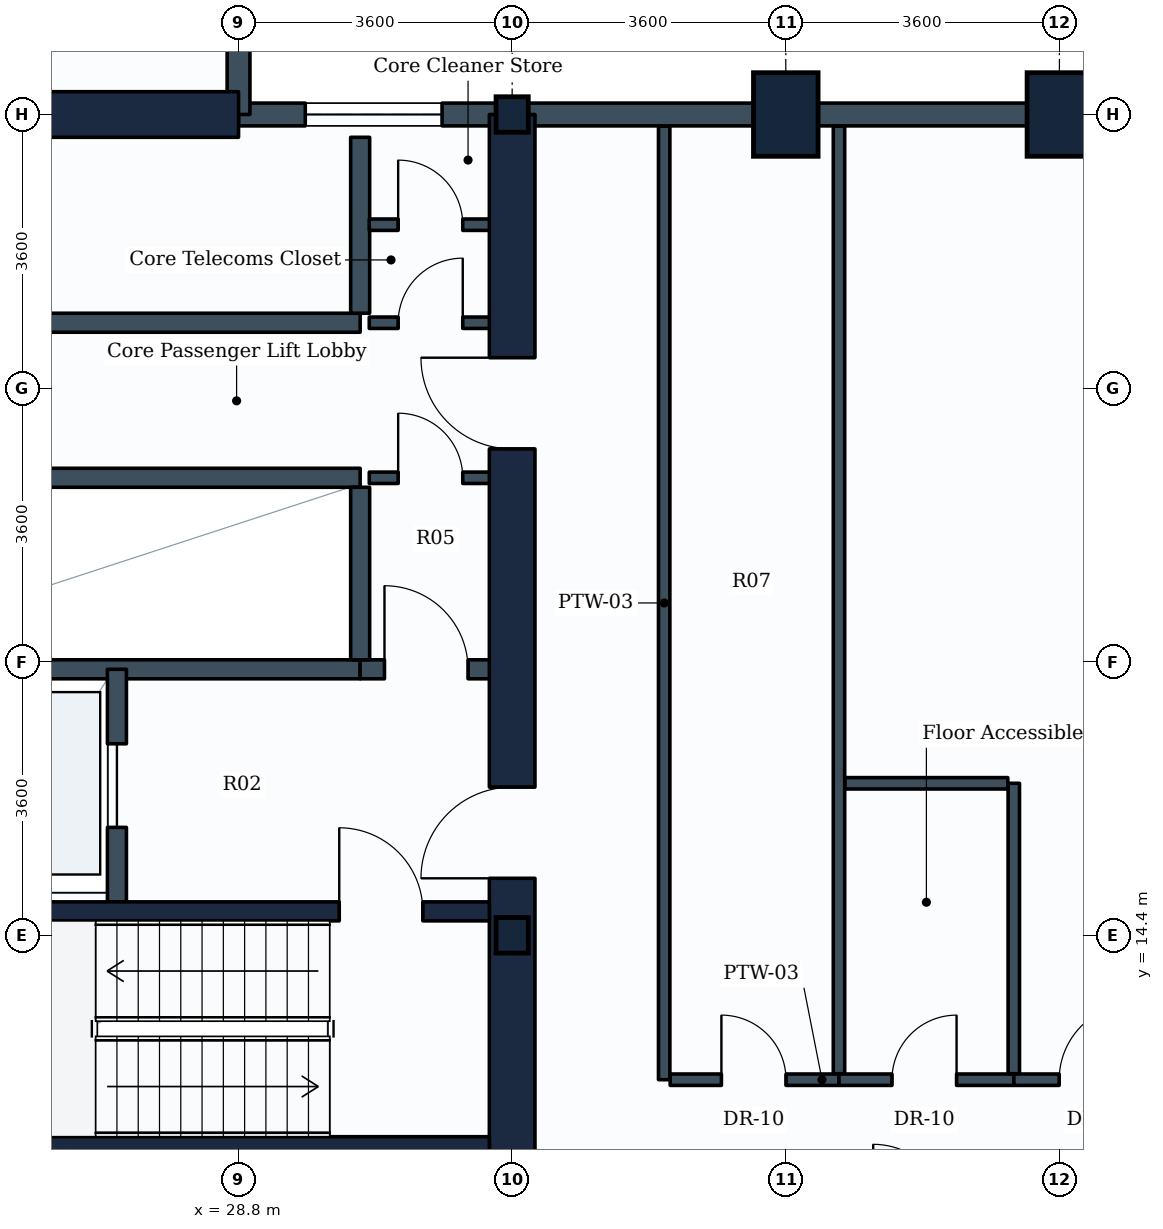
"""IFC4 building model, lengths in metres.
Left out: names, types, materials, properties, quantities, classifications, styles, units other than length and angle.
Written with IfcOpenShell. Run it as: python <this file> out.ifc"""

import sys

from ifc_helpers import new_model, si_unit, direction, frame, frame_2d, origin, origin_2d, place, context, subcontext, project, spatial, rectangle, i_section, extrude, element, fill, save


model = new_model("IFC4")
c1 = context("Model", 3, precision=1e-05, world=origin(), true_north=direction((0.0, 1.0)))
c2 = subcontext(c1, "Body", "Model", "MODEL_VIEW")
j1 = project(units=[si_unit("LENGTHUNIT", "METRE"), si_unit("PLANEANGLEUNIT", "RADIAN")], contexts=[c1])
p1 = place(None, origin())
s1 = spatial("IfcSite", under=j1, at=p1, CompositionType="ELEMENT")
p2 = place(p1, origin())
s2 = spatial("IfcBuilding", under=s1, at=p2, CompositionType="ELEMENT")
p3 = place(p2, frame((0.0, 0.0, 87.9)))
s3 = spatial("IfcBuildingStorey", under=s2, at=p3, CompositionType="ELEMENT", Elevation=87.9)
for number, where, z_axis, x_axis in (
    (1, (32.4, 14.4, 0.0), (0.0, 0.0, 1.0), (1.0, 0.0, 0.0)),
    (2, (32.4, 25.2, 0.0), (0.0, 0.0, 1.0), (1.0, 0.0, 0.0)),
):
    element("IfcColumn", number, at=place(p3, frame(where, z_axis=z_axis, x_axis=x_axis)), inside=s3, PredefinedType="COLUMN", context=c2, shape_type="SweptSolid", body=[
        extrude(i_section(OverallWidth=0.424, OverallDepth=0.467, WebThickness=0.033, FlangeThickness=0.053, FilletRadius=0.015, at=origin_2d()), origin(), (0.0, 0.0, 1.0), 3.9),
    ])
for number, where, z_axis, x_axis in (
    (3, (36.0, 25.2, 0.0), (0.0, 0.0, 1.0), (1.0, 0.0, 0.0)),
    (4, (39.6, 25.2, 0.0), (0.0, 0.0, 1.0), (1.0, 0.0, 0.0)),
):
    element("IfcColumn", number, at=place(p3, frame(where, z_axis=z_axis, x_axis=x_axis)), inside=s3, PredefinedType="COLUMN", context=c2, shape_type="SweptSolid", body=[
        extrude(rectangle(XDim=0.85, YDim=1.1, at=origin_2d()), origin(), (0.0, 0.0, 1.0), 3.9),
    ])
p4 = place(p3, frame((39.6, 25.2, 0.0), z_axis=(0.0, 0.0, 1.0), x_axis=(1.0, 0.0, 0.0)))
e5 = element("IfcWall", 5, at=p4, inside=s3, PredefinedType="STANDARD", context=c2, shape_type="SweptSolid", body=[
    extrude(rectangle(XDim=3.6, YDim=0.3, at=frame_2d((1.8, 0.0))), origin(), (0.0, 0.0, 1.0), 2.93),
])
p5 = place(p4, frame((0.9, 0.0, 0.85)))
e6 = element("IfcOpeningElement", 6, at=p5, cuts=e5, PredefinedType="OPENING", context=c2, shape_type="SweptSolid", body=[
    extrude(rectangle(XDim=1.8, YDim=1.35, at=frame_2d((0.9, 0.675))), frame((0.0, 0.16, 0.0), z_axis=(0.0, -1.0, 0.0), x_axis=(1.0, 0.0, 0.0)), (0.0, 0.0, 1.0), 0.32),
])
for number, where, z_axis, x_axis in (
    (7, (36.0, 25.2, 0.0), (0.0, 0.0, 1.0), (1.0, 0.0, 0.0)),
    (8, (32.4, 25.2, 0.0), (0.0, 0.0, 1.0), (1.0, 0.0, 0.0)),
):
    element("IfcWall", number, at=place(p3, frame(where, z_axis=z_axis, x_axis=x_axis)), inside=s3, PredefinedType="STANDARD", context=c2, shape_type="SweptSolid", body=[
        extrude(rectangle(XDim=3.6, YDim=0.3, at=frame_2d((1.8, 0.0))), origin(), (0.0, 0.0, 1.0), 2.93),
    ])
p6 = place(p3, frame((28.8, 25.2, 0.0), z_axis=(0.0, 0.0, 1.0), x_axis=(1.0, 0.0, 0.0)))
e9 = element("IfcWall", 9, at=p6, inside=s3, PredefinedType="STANDARD", context=c2, shape_type="SweptSolid", body=[
    extrude(rectangle(XDim=3.6, YDim=0.3, at=frame_2d((1.8, 0.0))), origin(), (0.0, 0.0, 1.0), 3.635),
])
p7 = place(p6, frame((0.878, 0.0, 0.85)))
e10 = element("IfcOpeningElement", 10, at=p7, cuts=e9, PredefinedType="OPENING", context=c2, shape_type="SweptSolid", body=[
    extrude(rectangle(XDim=1.8, YDim=1.35, at=frame_2d((0.9, 0.675))), frame((0.0, 0.16, 0.0), z_axis=(0.0, -1.0, 0.0), x_axis=(1.0, 0.0, 0.0)), (0.0, 0.0, 1.0), 0.32),
])
p8 = place(p3, frame((28.8, 28.8, 0.0), z_axis=(0.0, 0.0, 1.0), x_axis=(0.0, -1.0, 0.0)))
e11 = element("IfcWall", 11, at=p8, inside=s3, PredefinedType="STANDARD", context=c2, shape_type="SweptSolid", body=[
    extrude(rectangle(XDim=3.6, YDim=0.3, at=frame_2d((1.8, 0.0))), origin(), (0.0, 0.0, 1.0), 3.19),
])
p9 = place(p3, frame((14.4, 25.2, 0.0), z_axis=(0.0, 0.0, 1.0), x_axis=(1.0, 0.0, 0.0)))
e12 = element("IfcWall", 12, at=p9, inside=s3, PredefinedType="SHEAR", context=c2, shape_type="SweptSolid", body=[
    extrude(rectangle(XDim=14.4, YDim=0.6, at=frame_2d((7.2, 0.0))), origin(), (0.0, 0.0, 1.0), 3.65),
])
p10 = place(p3, frame((32.4, 10.8, 0.0), z_axis=(0.0, 0.0, 1.0), x_axis=(0.0, 1.0, 0.0)))
e13 = element("IfcWall", 13, at=p10, inside=s3, PredefinedType="SHEAR", context=c2, shape_type="SweptSolid", body=[
    extrude(rectangle(XDim=14.4, YDim=0.6, at=frame_2d((7.2, 0.0))), origin(), (0.0, 0.0, 1.0), 3.65),
])
p11 = place(p10, frame((4.35, 0.0, 0.0)))
e14 = element("IfcOpeningElement", 14, at=p11, cuts=e13, PredefinedType="OPENING", context=c2, shape_type="SweptSolid", body=[
    extrude(rectangle(XDim=1.2, YDim=2.1, at=frame_2d((0.6, 1.05))), frame((0.0, 0.31, 0.0), z_axis=(0.0, -1.0, 0.0), x_axis=(1.0, 0.0, 0.0)), (0.0, 0.0, 1.0), 0.62),
])
p12 = place(p10, frame((10.0, 0.0, 0.0)))
e15 = element("IfcOpeningElement", 15, at=p12, cuts=e13, PredefinedType="OPENING", context=c2, shape_type="SweptSolid", body=[
    extrude(rectangle(XDim=1.2, YDim=2.1, at=frame_2d((0.6, 1.05))), frame((0.0, 0.31, 0.0), z_axis=(0.0, -1.0, 0.0), x_axis=(1.0, 0.0, 0.0)), (0.0, 0.0, 1.0), 0.62),
])
p13 = place(p3, frame((23.35, 11.625, 0.0), z_axis=(0.0, 0.0, 1.0), x_axis=(1.0, 0.0, 0.0)))
e16 = element("IfcWall", 16, at=p13, inside=s3, PredefinedType="SHEAR", context=c2, shape_type="SweptSolid", body=[
    extrude(rectangle(XDim=8.75, YDim=0.25, at=frame_2d((4.375, 0.0))), origin(), (0.0, 0.0, 1.0), 3.65),
])
p14 = place(p3, frame((23.35, 14.715, 0.0), z_axis=(0.0, 0.0, 1.0), x_axis=(1.0, 0.0, 0.0)))
e17 = element("IfcWall", 17, at=p14, inside=s3, PredefinedType="SHEAR", context=c2, shape_type="SweptSolid", body=[
    extrude(rectangle(XDim=8.75, YDim=0.25, at=frame_2d((4.375, 0.0))), origin(), (0.0, 0.0, 1.0), 3.65),
])
p15 = place(p14, frame((6.775, 0.0, 0.0)))
e18 = element("IfcOpeningElement", 18, at=p15, cuts=e17, PredefinedType="OPENING", context=c2, shape_type="SweptSolid", body=[
    extrude(rectangle(XDim=1.1, YDim=2.1, at=frame_2d((0.55, 1.05))), frame((0.0, 0.135, 0.0), z_axis=(0.0, -1.0, 0.0), x_axis=(1.0, 0.0, 0.0)), (0.0, 0.0, 1.0), 0.27),
])
p16 = place(p3, frame((21.88, 17.9, 0.0), z_axis=(0.0, 0.0, 1.0), x_axis=(1.0, 0.0, 0.0)))
e19 = element("IfcWall", 19, at=p16, inside=s3, PredefinedType="PARTITIONING", context=c2, shape_type="SweptSolid", body=[
    extrude(rectangle(XDim=8.52, YDim=0.25, at=frame_2d((4.26, 0.0))), origin(), (0.0, 0.0, 1.0), 3.635),
])
p17 = place(p3, frame((30.4, 17.9, 0.0), z_axis=(0.0, 0.0, 1.0), x_axis=(1.0, 0.0, 0.0)))
e20 = element("IfcWall", 20, at=p17, inside=s3, PredefinedType="PARTITIONING", context=c2, shape_type="SweptSolid", body=[
    extrude(rectangle(XDim=1.75, YDim=0.25, at=frame_2d((0.875, 0.0))), origin(), (0.0, 0.0, 1.0), 3.635),
])
p18 = place(p17, frame((0.32, 0.0, 0.0)))
e21 = element("IfcOpeningElement", 21, at=p18, cuts=e20, PredefinedType="OPENING", context=c2, shape_type="SweptSolid", body=[
    extrude(rectangle(XDim=1.1, YDim=2.1, at=frame_2d((0.55, 1.05))), frame((0.0, 0.135, 0.0), z_axis=(0.0, -1.0, 0.0), x_axis=(1.0, 0.0, 0.0)), (0.0, 0.0, 1.0), 0.27),
])
p19 = place(p3, frame((27.2, 14.84, 0.0), z_axis=(0.0, 0.0, 1.0), x_axis=(0.0, 1.0, 0.0)))
e22 = element("IfcWall", 22, at=p19, inside=s3, PredefinedType="PARTITIONING", context=c2, shape_type="SweptSolid", body=[
    extrude(rectangle(XDim=3.06, YDim=0.25, at=frame_2d((1.53, 0.0))), origin(), (0.0, 0.0, 1.0), 3.635),
])
p20 = place(p19, frame((0.98, 0.0, 0.0)))
e23 = element("IfcOpeningElement", 23, at=p20, cuts=e22, PredefinedType="OPENING", context=c2, shape_type="SweptSolid", body=[
    extrude(rectangle(XDim=1.1, YDim=2.1, at=frame_2d((0.55, 1.05))), frame((0.0, 0.135, 0.0), z_axis=(0.0, -1.0, 0.0), x_axis=(1.0, 0.0, 0.0)), (0.0, 0.0, 1.0), 0.27),
])
p21 = place(p3, frame((23.18, 20.42, 0.0), z_axis=(0.0, 0.0, 1.0), x_axis=(1.0, 0.0, 0.0)))
e24 = element("IfcWall", 24, at=p21, inside=s3, PredefinedType="PARTITIONING", context=c2, shape_type="SweptSolid", body=[
    extrude(rectangle(XDim=7.22, YDim=0.25, at=frame_2d((3.61, 0.0))), origin(), (0.0, 0.0, 1.0), 3.635),
])
p22 = place(p3, frame((30.4, 18.025, 0.0), z_axis=(0.0, 0.0, 1.0), x_axis=(0.0, 1.0, 0.0)))
e25 = element("IfcWall", 25, at=p22, inside=s3, PredefinedType="PARTITIONING", context=c2, shape_type="SweptSolid", body=[
    extrude(rectangle(XDim=2.27, YDim=0.25, at=frame_2d((1.135, 0.0))), origin(), (0.0, 0.0, 1.0), 3.635),
])
p23 = place(p3, frame((23.18, 22.46, 0.0), z_axis=(0.0, 0.0, 1.0), x_axis=(1.0, 0.0, 0.0)))
e26 = element("IfcWall", 26, at=p23, inside=s3, PredefinedType="PARTITIONING", context=c2, shape_type="SweptSolid", body=[
    extrude(rectangle(XDim=7.22, YDim=0.25, at=frame_2d((3.61, 0.0))), origin(), (0.0, 0.0, 1.0), 3.635),
])
p24 = place(p3, frame((30.4, 22.585, 0.0), z_axis=(0.0, 0.0, 1.0), x_axis=(0.0, 1.0, 0.0)))
e27 = element("IfcWall", 27, at=p24, inside=s3, PredefinedType="PARTITIONING", context=c2, shape_type="SweptSolid", body=[
    extrude(rectangle(XDim=2.315, YDim=0.25, at=frame_2d((1.157, 0.0))), origin(), (0.0, 0.0, 1.0), 3.635),
])
p25 = place(p3, frame((30.52, 22.46, 0.0), z_axis=(0.0, 0.0, 1.0), x_axis=(1.0, 0.0, 0.0)))
e28 = element("IfcWall", 28, at=p25, inside=s3, PredefinedType="PARTITIONING", context=c2, shape_type="SweptSolid", body=[
    extrude(rectangle(XDim=1.63, YDim=0.15, at=frame_2d((0.815, 0.0))), origin(), (0.0, 0.0, 1.0), 3.635),
])
p26 = place(p25, frame((0.38, 0.0, 0.0)))
e29 = element("IfcOpeningElement", 29, at=p26, cuts=e28, PredefinedType="OPENING", context=c2, shape_type="SweptSolid", body=[
    extrude(rectangle(XDim=0.85, YDim=2.1, at=frame_2d((0.425, 1.05))), frame((0.0, 0.085, 0.0), z_axis=(0.0, -1.0, 0.0), x_axis=(1.0, 0.0, 0.0)), (0.0, 0.0, 1.0), 0.17),
])
p27 = place(p3, frame((30.52, 23.75, 0.0), z_axis=(0.0, 0.0, 1.0), x_axis=(1.0, 0.0, 0.0)))
e30 = element("IfcWall", 30, at=p27, inside=s3, PredefinedType="PARTITIONING", context=c2, shape_type="SweptSolid", body=[
    extrude(rectangle(XDim=1.63, YDim=0.15, at=frame_2d((0.815, 0.0))), origin(), (0.0, 0.0, 1.0), 3.635),
])
p28 = place(p27, frame((0.38, 0.0, 0.0)))
e31 = element("IfcOpeningElement", 31, at=p28, cuts=e30, PredefinedType="OPENING", context=c2, shape_type="SweptSolid", body=[
    extrude(rectangle(XDim=0.85, YDim=2.1, at=frame_2d((0.425, 1.05))), frame((0.0, 0.085, 0.0), z_axis=(0.0, -1.0, 0.0), x_axis=(1.0, 0.0, 0.0)), (0.0, 0.0, 1.0), 0.17),
])
p29 = place(p3, frame((30.52, 20.42, 0.0), z_axis=(0.0, 0.0, 1.0), x_axis=(1.0, 0.0, 0.0)))
e32 = element("IfcWall", 32, at=p29, inside=s3, PredefinedType="PARTITIONING", context=c2, shape_type="SweptSolid", body=[
    extrude(rectangle(XDim=1.63, YDim=0.15, at=frame_2d((0.815, 0.0))), origin(), (0.0, 0.0, 1.0), 3.635),
])
p30 = place(p29, frame((0.38, 0.0, 0.0)))
e33 = element("IfcOpeningElement", 33, at=p30, cuts=e32, PredefinedType="OPENING", context=c2, shape_type="SweptSolid", body=[
    extrude(rectangle(XDim=0.85, YDim=2.1, at=frame_2d((0.425, 1.05))), frame((0.0, 0.085, 0.0), z_axis=(0.0, -1.0, 0.0), x_axis=(1.0, 0.0, 0.0)), (0.0, 0.0, 1.0), 0.17),
])
p31 = place(p3, frame((34.4, 12.5, 0.0), z_axis=(0.0, 0.0, 1.0), x_axis=(0.0, 1.0, 0.0)))
e34 = element("IfcWall", 34, at=p31, inside=s3, PredefinedType="PARTITIONING", context=c2, shape_type="SweptSolid", body=[
    extrude(rectangle(XDim=12.546, YDim=0.15, at=frame_2d((6.273, 0.0))), origin(), (0.0, 0.0, 1.0), 2.93),
])
p32 = place(p3, frame((34.479, 12.5, 0.0), z_axis=(0.0, 0.0, 1.0), x_axis=(1.0, 0.0, 0.0)))
e35 = element("IfcWall", 35, at=p32, inside=s3, PredefinedType="PARTITIONING", context=c2, shape_type="SweptSolid", body=[
    extrude(rectangle(XDim=2.221, YDim=0.15, at=frame_2d((1.11, 0.0))), origin(), (0.0, 0.0, 1.0), 3.18),
])
p33 = place(p32, frame((0.674, 0.0, 0.0)))
e36 = element("IfcOpeningElement", 36, at=p33, cuts=e35, PredefinedType="OPENING", context=c2, shape_type="SweptSolid", body=[
    extrude(rectangle(XDim=0.85, YDim=2.1, at=frame_2d((0.425, 1.05))), frame((0.0, 0.085, 0.0), z_axis=(0.0, -1.0, 0.0), x_axis=(1.0, 0.0, 0.0)), (0.0, 0.0, 1.0), 0.17),
])
p34 = place(p3, frame((36.7, 12.579, 0.0), z_axis=(0.0, 0.0, 1.0), x_axis=(0.0, 1.0, 0.0)))
e37 = element("IfcWall", 37, at=p34, inside=s3, PredefinedType="PARTITIONING", context=c2, shape_type="SweptSolid", body=[
    extrude(rectangle(XDim=12.467, YDim=0.15, at=frame_2d((6.233, 0.0))), origin(), (0.0, 0.0, 1.0), 2.93),
])
p35 = place(p3, frame((36.7, 12.5, 0.0), z_axis=(0.0, 0.0, 1.0), x_axis=(1.0, 0.0, 0.0)))
e38 = element("IfcWall", 38, at=p35, inside=s3, PredefinedType="PARTITIONING", context=c2, shape_type="SweptSolid", body=[
    extrude(rectangle(XDim=2.3, YDim=0.15, at=frame_2d((1.15, 0.0))), origin(), (0.0, 0.0, 1.0), 3.635),
])
p36 = place(p35, frame((0.697, 0.0, 0.0)))
e39 = element("IfcOpeningElement", 39, at=p36, cuts=e38, PredefinedType="OPENING", context=c2, shape_type="SweptSolid", body=[
    extrude(rectangle(XDim=0.85, YDim=2.1, at=frame_2d((0.425, 1.05))), frame((0.0, 0.085, 0.0), z_axis=(0.0, -1.0, 0.0), x_axis=(1.0, 0.0, 0.0)), (0.0, 0.0, 1.0), 0.17),
])
p37 = place(p3, frame((39.0, 12.579, 0.0), z_axis=(0.0, 0.0, 1.0), x_axis=(0.0, 1.0, 0.0)))
e40 = element("IfcWall", 40, at=p37, inside=s3, PredefinedType="PARTITIONING", context=c2, shape_type="SweptSolid", body=[
    extrude(rectangle(XDim=3.821, YDim=0.15, at=frame_2d((1.91, 0.0))), origin(), (0.0, 0.0, 1.0), 3.18),
])
p38 = place(p3, frame((36.779, 16.4, 0.0), z_axis=(0.0, 0.0, 1.0), x_axis=(1.0, 0.0, 0.0)))
e41 = element("IfcWall", 41, at=p38, inside=s3, PredefinedType="PARTITIONING", context=c2, shape_type="SweptSolid", body=[
    extrude(rectangle(XDim=2.142, YDim=0.15, at=frame_2d((1.071, 0.0))), origin(), (0.0, 0.0, 1.0), 3.635),
])
p39 = place(p3, frame((39.0, 12.5, 0.0), z_axis=(0.0, 0.0, 1.0), x_axis=(1.0, 0.0, 0.0)))
e42 = element("IfcWall", 42, at=p39, inside=s3, PredefinedType="PARTITIONING", context=c2, shape_type="SweptSolid", body=[
    extrude(rectangle(XDim=8.291, YDim=0.15, at=frame_2d((4.146, 0.0))), origin(), (0.0, 0.0, 1.0), 3.19),
])
p40 = place(p39, frame((0.597, 0.0, 0.0)))
e43 = element("IfcOpeningElement", 43, at=p40, cuts=e42, PredefinedType="OPENING", context=c2, shape_type="SweptSolid", body=[
    extrude(rectangle(XDim=1.0, YDim=2.1, at=frame_2d((0.5, 1.05))), frame((0.0, 0.085, 0.0), z_axis=(0.0, -1.0, 0.0), x_axis=(1.0, 0.0, 0.0)), (0.0, 0.0, 1.0), 0.17),
])
p41 = place(p7, origin())
e44 = element("IfcWindow", 44, at=p41, inside=s3, PartitioningType="SINGLE_PANEL", PredefinedType="WINDOW", context=c2, shape_type="SweptSolid", body=[
    extrude(rectangle(XDim=1.8, YDim=1.35, at=frame_2d((0.9, 0.675))), frame((0.0, 0.03, 0.0), z_axis=(0.0, -1.0, 0.0), x_axis=(1.0, 0.0, 0.0)), (0.0, 0.0, 1.0), 0.06),
])
fill(e10, e44)
p42 = place(p15, origin())
e45 = element("IfcDoor", 45, at=p42, inside=s3, OperationType="SINGLE_SWING_LEFT", PredefinedType="DOOR", context=c2, shape_type="SweptSolid", body=[
    extrude(rectangle(XDim=1.1, YDim=2.1, at=frame_2d((0.55, 1.05))), frame((0.0, 0.025, 0.0), z_axis=(0.0, -1.0, 0.0), x_axis=(1.0, 0.0, 0.0)), (0.0, 0.0, 1.0), 0.05),
])
fill(e18, e45)
p43 = place(p20, origin())
e46 = element("IfcDoor", 46, at=p43, inside=s3, OperationType="SLIDING_TO_LEFT", PredefinedType="DOOR", context=c2, shape_type="SweptSolid", body=[
    extrude(rectangle(XDim=1.1, YDim=2.1, at=frame_2d((0.55, 1.05))), frame((0.0, 0.025, 0.0), z_axis=(0.0, -1.0, 0.0), x_axis=(1.0, 0.0, 0.0)), (0.0, 0.0, 1.0), 0.05),
])
fill(e23, e46)
p44 = place(p11, origin())
e47 = element("IfcDoor", 47, at=p44, inside=s3, OperationType="SINGLE_SWING_LEFT", PredefinedType="DOOR", context=c2, shape_type="SweptSolid", body=[
    extrude(rectangle(XDim=1.2, YDim=2.1, at=frame_2d((0.6, 1.05))), frame((0.0, 0.025, 0.0), z_axis=(0.0, -1.0, 0.0), x_axis=(1.0, 0.0, 0.0)), (0.0, 0.0, 1.0), 0.05),
])
fill(e14, e47)
p45 = place(p18, origin())
e48 = element("IfcDoor", 48, at=p45, inside=s3, OperationType="SINGLE_SWING_LEFT", PredefinedType="DOOR", context=c2, shape_type="SweptSolid", body=[
    extrude(rectangle(XDim=1.1, YDim=2.1, at=frame_2d((0.55, 1.05))), frame((0.0, 0.025, 0.0), z_axis=(0.0, -1.0, 0.0), x_axis=(1.0, 0.0, 0.0)), (0.0, 0.0, 1.0), 0.05),
])
fill(e21, e48)
p46 = place(p12, origin())
e49 = element("IfcDoor", 49, at=p46, inside=s3, OperationType="SINGLE_SWING_RIGHT", PredefinedType="DOOR", context=c2, shape_type="SweptSolid", body=[
    extrude(rectangle(XDim=1.2, YDim=2.1, at=frame_2d((0.6, 1.05))), frame((0.0, 0.025, 0.0), z_axis=(0.0, -1.0, 0.0), x_axis=(1.0, 0.0, 0.0)), (0.0, 0.0, 1.0), 0.05),
])
fill(e15, e49)
p47 = place(p26, origin())
e50 = element("IfcDoor", 50, at=p47, inside=s3, OperationType="SINGLE_SWING_RIGHT", PredefinedType="DOOR", context=c2, shape_type="SweptSolid", body=[
    extrude(rectangle(XDim=0.85, YDim=2.1, at=frame_2d((0.425, 1.05))), frame((0.0, 0.025, 0.0), z_axis=(0.0, -1.0, 0.0), x_axis=(1.0, 0.0, 0.0)), (0.0, 0.0, 1.0), 0.05),
])
fill(e29, e50)
p48 = place(p28, origin())
e51 = element("IfcDoor", 51, at=p48, inside=s3, OperationType="SINGLE_SWING_LEFT", PredefinedType="DOOR", context=c2, shape_type="SweptSolid", body=[
    extrude(rectangle(XDim=0.85, YDim=2.1, at=frame_2d((0.425, 1.05))), frame((0.0, 0.025, 0.0), z_axis=(0.0, -1.0, 0.0), x_axis=(1.0, 0.0, 0.0)), (0.0, 0.0, 1.0), 0.05),
])
fill(e31, e51)
p49 = place(p30, origin())
e52 = element("IfcDoor", 52, at=p49, inside=s3, OperationType="SINGLE_SWING_LEFT", PredefinedType="DOOR", context=c2, shape_type="SweptSolid", body=[
    extrude(rectangle(XDim=0.85, YDim=2.1, at=frame_2d((0.425, 1.05))), frame((0.0, 0.025, 0.0), z_axis=(0.0, -1.0, 0.0), x_axis=(1.0, 0.0, 0.0)), (0.0, 0.0, 1.0), 0.05),
])
fill(e33, e52)
p50 = place(p33, origin())
e53 = element("IfcDoor", 53, at=p50, inside=s3, OperationType="SINGLE_SWING_LEFT", PredefinedType="DOOR", context=c2, shape_type="SweptSolid", body=[
    extrude(rectangle(XDim=0.85, YDim=2.1, at=frame_2d((0.425, 1.05))), frame((0.0, 0.025, 0.0), z_axis=(0.0, -1.0, 0.0), x_axis=(1.0, 0.0, 0.0)), (0.0, 0.0, 1.0), 0.05),
])
fill(e36, e53)
p51 = place(p36, origin())
e54 = element("IfcDoor", 54, at=p51, inside=s3, OperationType="SINGLE_SWING_RIGHT", PredefinedType="DOOR", context=c2, shape_type="SweptSolid", body=[
    extrude(rectangle(XDim=0.85, YDim=2.1, at=frame_2d((0.425, 1.05))), frame((0.0, 0.025, 0.0), z_axis=(0.0, -1.0, 0.0), x_axis=(1.0, 0.0, 0.0)), (0.0, 0.0, 1.0), 0.05),
])
fill(e39, e54)
p52 = place(p40, origin())
e55 = element("IfcDoor", 55, at=p52, inside=s3, OperationType="SINGLE_SWING_RIGHT", PredefinedType="DOOR", context=c2, shape_type="SweptSolid", body=[
    extrude(rectangle(XDim=1.0, YDim=2.1, at=frame_2d((0.5, 1.05))), frame((0.0, 0.025, 0.0), z_axis=(0.0, -1.0, 0.0), x_axis=(1.0, 0.0, 0.0)), (0.0, 0.0, 1.0), 0.05),
])
fill(e43, e55)
save(model, sys.argv[1])
